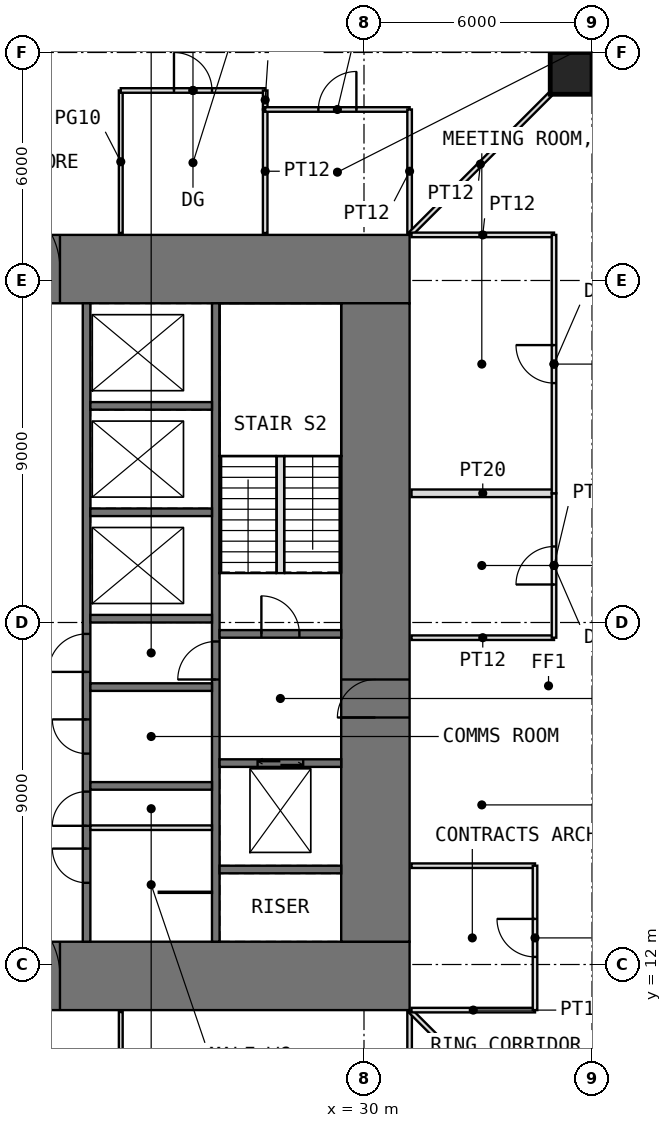
"""IFC4 building model, lengths in metres.
Left out: names, types, materials, properties, quantities, classifications, styles, units other than length and angle.
Written with IfcOpenShell. Run it as: python <this file> out.ifc"""

import sys

from ifc_helpers import new_model, si_unit, direction, frame, frame_2d, origin, origin_2d, place, context, subcontext, project, spatial, rectangle, extrude, element, fill, save


model = new_model("IFC4")
c1 = context("Model", 3, precision=1e-05, world=origin(), true_north=direction((0.0, 1.0)))
c2 = subcontext(c1, "Body", "Model", "MODEL_VIEW")
j1 = project(units=[si_unit("LENGTHUNIT", "METRE"), si_unit("PLANEANGLEUNIT", "RADIAN")], contexts=[c1])
p1 = place(None, origin())
s1 = spatial("IfcSite", under=j1, at=p1, CompositionType="ELEMENT")
p2 = place(p1, origin())
s2 = spatial("IfcBuilding", under=s1, at=p2, CompositionType="ELEMENT")
p3 = place(p2, frame((0.0, 0.0, 70.5)))
s3 = spatial("IfcBuildingStorey", under=s2, at=p3, CompositionType="ELEMENT", Elevation=70.5)
p4 = place(p3, frame((35.45, 35.45, 0.0), z_axis=(0.0, 0.0, 1.0), x_axis=(1.0, 0.0, 0.0)))
e1 = element("IfcColumn", 1, at=p4, inside=s3, PredefinedType="COLUMN", context=c2, shape_type="SweptSolid", body=[
    extrude(rectangle(XDim=1.1, YDim=1.1, at=origin_2d()), origin(), (0.0, 0.0, 1.0), 4.0),
])
p5 = place(p3, frame((10.8, 11.7, -0.05), z_axis=(0.0, 0.0, 1.0), x_axis=(1.0, 0.0, 0.0)))
e2 = element("IfcWall", 2, at=p5, inside=s3, PredefinedType="SHEAR", context=c2, shape_type="SweptSolid", body=[
    extrude(rectangle(XDim=20.4, YDim=1.8, at=frame_2d((10.2, 0.0))), origin(), (0.0, 0.0, 1.0), 4.0),
])
p6 = place(p5, frame((9.2, 0.0, 0.05)))
e3 = element("IfcOpeningElement", 3, at=p6, cuts=e2, PredefinedType="OPENING", context=c2, shape_type="SweptSolid", body=[
    extrude(rectangle(XDim=2.0, YDim=2.2, at=frame_2d((1.0, 1.1))), frame((0.0, 0.91, 0.0), z_axis=(0.0, -1.0, 0.0), x_axis=(1.0, 0.0, 0.0)), (0.0, 0.0, 1.0), 1.82),
])
p7 = place(p3, frame((10.8, 30.3, -0.05), z_axis=(0.0, 0.0, 1.0), x_axis=(1.0, 0.0, 0.0)))
e4 = element("IfcWall", 4, at=p7, inside=s3, PredefinedType="SHEAR", context=c2, shape_type="SweptSolid", body=[
    extrude(rectangle(XDim=20.4, YDim=1.8, at=frame_2d((10.2, 0.0))), origin(), (0.0, 0.0, 1.0), 4.0),
])
p8 = place(p7, frame((9.2, 0.0, 0.05)))
e5 = element("IfcOpeningElement", 5, at=p8, cuts=e4, PredefinedType="OPENING", context=c2, shape_type="SweptSolid", body=[
    extrude(rectangle(XDim=2.0, YDim=2.2, at=frame_2d((1.0, 1.1))), frame((0.0, 0.91, 0.0), z_axis=(0.0, -1.0, 0.0), x_axis=(1.0, 0.0, 0.0)), (0.0, 0.0, 1.0), 1.82),
])
p9 = place(p3, frame((30.3, 12.6, -0.05), z_axis=(0.0, 0.0, 1.0), x_axis=(0.0, 1.0, 0.0)))
e6 = element("IfcWall", 6, at=p9, inside=s3, PredefinedType="SHEAR", context=c2, shape_type="SweptSolid", body=[
    extrude(rectangle(XDim=16.8, YDim=1.8, at=frame_2d((8.4, 0.0))), origin(), (0.0, 0.0, 1.0), 4.0),
])
p10 = place(p9, frame((5.9, 0.0, 0.05)))
e7 = element("IfcOpeningElement", 7, at=p10, cuts=e6, PredefinedType="OPENING", context=c2, shape_type="SweptSolid", body=[
    extrude(rectangle(XDim=1.0, YDim=2.2, at=frame_2d((0.5, 1.1))), frame((0.0, 0.91, 0.0), z_axis=(0.0, -1.0, 0.0), x_axis=(1.0, 0.0, 0.0)), (0.0, 0.0, 1.0), 1.82),
])
p11 = place(p3, frame((22.7, 12.6, -0.05), z_axis=(0.0, 0.0, 1.0), x_axis=(0.0, 1.0, 0.0)))
e8 = element("IfcWall", 8, at=p11, inside=s3, PredefinedType="SHEAR", context=c2, shape_type="SweptSolid", body=[
    extrude(rectangle(XDim=16.8, YDim=0.2, at=frame_2d((8.4, 0.0))), origin(), (0.0, 0.0, 1.0), 4.0),
])
p12 = place(p11, frame((3.05, 0.0, 0.05)))
e9 = element("IfcOpeningElement", 9, at=p12, cuts=e8, PredefinedType="OPENING", context=c2, shape_type="SweptSolid", body=[
    extrude(rectangle(XDim=0.9, YDim=2.2, at=frame_2d((0.45, 1.1))), frame((0.0, 0.11, 0.0), z_axis=(0.0, -1.0, 0.0), x_axis=(1.0, 0.0, 0.0)), (0.0, 0.0, 1.0), 0.22),
])
p13 = place(p11, frame((7.1, 0.0, 0.05)))
e10 = element("IfcOpeningElement", 10, at=p13, cuts=e8, PredefinedType="OPENING", context=c2, shape_type="SweptSolid", body=[
    extrude(rectangle(XDim=1.0, YDim=2.2, at=frame_2d((0.5, 1.1))), frame((0.0, 0.11, 0.0), z_axis=(0.0, -1.0, 0.0), x_axis=(1.0, 0.0, 0.0)), (0.0, 0.0, 1.0), 0.22),
])
p14 = place(p11, frame((1.55, 0.0, 0.05)))
e11 = element("IfcOpeningElement", 11, at=p14, cuts=e8, PredefinedType="OPENING", context=c2, shape_type="SweptSolid", body=[
    extrude(rectangle(XDim=0.9, YDim=2.2, at=frame_2d((0.45, 1.1))), frame((0.0, 0.11, 0.0), z_axis=(0.0, -1.0, 0.0), x_axis=(1.0, 0.0, 0.0)), (0.0, 0.0, 1.0), 0.22),
])
p15 = place(p11, frame((4.95, 0.0, 0.05)))
e12 = element("IfcOpeningElement", 12, at=p15, cuts=e8, PredefinedType="OPENING", context=c2, shape_type="SweptSolid", body=[
    extrude(rectangle(XDim=0.9, YDim=2.2, at=frame_2d((0.45, 1.1))), frame((0.0, 0.11, 0.0), z_axis=(0.0, -1.0, 0.0), x_axis=(1.0, 0.0, 0.0)), (0.0, 0.0, 1.0), 0.22),
])
p16 = place(p3, frame((26.1, 12.6, -0.05), z_axis=(0.0, 0.0, 1.0), x_axis=(0.0, 1.0, 0.0)))
e13 = element("IfcWall", 13, at=p16, inside=s3, PredefinedType="SHEAR", context=c2, shape_type="SweptSolid", body=[
    extrude(rectangle(XDim=16.8, YDim=0.2, at=frame_2d((8.4, 0.0))), origin(), (0.0, 0.0, 1.0), 4.0),
])
p17 = place(p16, frame((6.9, 0.0, 0.05)))
e14 = element("IfcOpeningElement", 14, at=p17, cuts=e13, PredefinedType="OPENING", context=c2, shape_type="SweptSolid", body=[
    extrude(rectangle(XDim=1.0, YDim=2.2, at=frame_2d((0.5, 1.1))), frame((0.0, 0.11, 0.0), z_axis=(0.0, -1.0, 0.0), x_axis=(1.0, 0.0, 0.0)), (0.0, 0.0, 1.0), 0.22),
])
for number, where, z_axis, x_axis in (
    (15, (22.8, 16.7, -0.05), (0.0, 0.0, 1.0), (1.0, 0.0, 0.0)),
    (16, (22.8, 19.3, -0.05), (0.0, 0.0, 1.0), (1.0, 0.0, 0.0)),
    (17, (22.8, 21.1, -0.05), (0.0, 0.0, 1.0), (1.0, 0.0, 0.0)),
    (18, (22.8, 23.9, -0.05), (0.0, 0.0, 1.0), (1.0, 0.0, 0.0)),
    (19, (22.8, 26.7, -0.05), (0.0, 0.0, 1.0), (1.0, 0.0, 0.0)),
    (20, (26.2, 14.5, -0.05), (0.0, 0.0, 1.0), (1.0, 0.0, 0.0)),
):
    element("IfcWall", number, at=place(p3, frame(where, z_axis=z_axis, x_axis=x_axis)), inside=s3, PredefinedType="SHEAR", context=c2, shape_type="SweptSolid", body=[
        extrude(rectangle(XDim=3.2, YDim=0.2, at=frame_2d((1.6, 0.0))), origin(), (0.0, 0.0, 1.0), 4.0),
    ])
p18 = place(p3, frame((26.2, 17.3, -0.05), z_axis=(0.0, 0.0, 1.0), x_axis=(1.0, 0.0, 0.0)))
e21 = element("IfcWall", 21, at=p18, inside=s3, PredefinedType="SHEAR", context=c2, shape_type="SweptSolid", body=[
    extrude(rectangle(XDim=3.2, YDim=0.2, at=frame_2d((1.6, 0.0))), origin(), (0.0, 0.0, 1.0), 4.0),
])
p19 = place(p18, frame((1.0, 0.0, 0.05)))
e22 = element("IfcOpeningElement", 22, at=p19, cuts=e21, PredefinedType="OPENING", context=c2, shape_type="SweptSolid", body=[
    extrude(rectangle(XDim=1.2, YDim=2.2, at=frame_2d((0.6, 1.1))), frame((0.0, 0.11, 0.0), z_axis=(0.0, -1.0, 0.0), x_axis=(1.0, 0.0, 0.0)), (0.0, 0.0, 1.0), 0.22),
])
p20 = place(p3, frame((26.2, 20.7, -0.05), z_axis=(0.0, 0.0, 1.0), x_axis=(1.0, 0.0, 0.0)))
e23 = element("IfcWall", 23, at=p20, inside=s3, PredefinedType="SHEAR", context=c2, shape_type="SweptSolid", body=[
    extrude(rectangle(XDim=3.2, YDim=0.2, at=frame_2d((1.6, 0.0))), origin(), (0.0, 0.0, 1.0), 4.0),
])
p21 = place(p20, frame((1.1, 0.0, 0.05)))
e24 = element("IfcOpeningElement", 24, at=p21, cuts=e23, PredefinedType="OPENING", context=c2, shape_type="SweptSolid", body=[
    extrude(rectangle(XDim=1.0, YDim=2.2, at=frame_2d((0.5, 1.1))), frame((0.0, 0.11, 0.0), z_axis=(0.0, -1.0, 0.0), x_axis=(1.0, 0.0, 0.0)), (0.0, 0.0, 1.0), 0.22),
])
p22 = place(p3, frame((22.8, 15.6, 0.0), z_axis=(0.0, 0.0, 1.0), x_axis=(1.0, 0.0, 0.0)))
e25 = element("IfcWall", 25, at=p22, inside=s3, PredefinedType="PARTITIONING", context=c2, shape_type="SweptSolid", body=[
    extrude(rectangle(XDim=3.2, YDim=0.12, at=frame_2d((1.6, 0.0))), origin(), (0.0, 0.0, 1.0), 3.75),
])
p23 = place(p3, frame((24.6, 13.9, 0.0), z_axis=(0.0, 0.0, 1.0), x_axis=(1.0, 0.0, 0.0)))
e26 = element("IfcWall", 26, at=p23, inside=s3, PredefinedType="PARTITIONING", context=c2, shape_type="SweptSolid", body=[
    extrude(rectangle(XDim=1.4, YDim=0.03, at=frame_2d((0.7, 0.0))), origin(), (0.0, 0.0, 1.0), 3.75),
])
for number, where, z_axis, x_axis in (
    (27, (23.6, 7.0, 0.0), (0.0, 0.0, 1.0), (0.0, 1.0, 0.0)),
    (28, (23.6, 31.25, 0.0), (0.0, 0.0, 1.0), (0.0, 1.0, 0.0)),
):
    element("IfcWall", number, at=place(p3, frame(where, z_axis=z_axis, x_axis=x_axis)), inside=s3, PredefinedType="PARTITIONING", context=c2, shape_type="SweptSolid", body=[
        extrude(rectangle(XDim=3.75, YDim=0.1, at=frame_2d((1.875, 0.0))), origin(), (0.0, 0.0, 1.0), 3.75),
    ])
p24 = place(p3, frame((23.6, 35.0, 0.0), z_axis=(0.0, 0.0, 1.0), x_axis=(1.0, 0.0, 0.0)))
e29 = element("IfcWall", 29, at=p24, inside=s3, PredefinedType="PARTITIONING", context=c2, shape_type="SweptSolid", body=[
    extrude(rectangle(XDim=3.8, YDim=0.12, at=frame_2d((1.9, 0.0))), origin(), (0.0, 0.0, 1.0), 3.75),
])
p25 = place(p24, frame((1.4, 0.0, 0.0)))
e30 = element("IfcOpeningElement", 30, at=p25, cuts=e29, PredefinedType="OPENING", context=c2, shape_type="SweptSolid", body=[
    extrude(rectangle(XDim=1.0, YDim=2.4, at=frame_2d((0.5, 1.2))), frame((0.0, 0.07, 0.0), z_axis=(0.0, -1.0, 0.0), x_axis=(1.0, 0.0, 0.0)), (0.0, 0.0, 1.0), 0.14),
])
p26 = place(p3, frame((27.4, 31.25, 0.0), z_axis=(0.0, 0.0, 1.0), x_axis=(0.0, 1.0, 0.0)))
e31 = element("IfcWall", 31, at=p26, inside=s3, PredefinedType="PARTITIONING", context=c2, shape_type="SweptSolid", body=[
    extrude(rectangle(XDim=3.25, YDim=0.12, at=frame_2d((1.625, 0.0))), origin(), (0.0, 0.0, 1.0), 3.75),
])
p27 = place(p3, frame((27.4, 34.5, 0.0), z_axis=(0.0, 0.0, 1.0), x_axis=(0.0, 1.0, 0.0)))
e32 = element("IfcWall", 32, at=p27, inside=s3, PredefinedType="PARTITIONING", context=c2, shape_type="SweptSolid", body=[
    extrude(rectangle(XDim=0.5, YDim=0.12, at=frame_2d((0.25, 0.0))), origin(), (0.0, 0.0, 1.0), 3.75),
])
p28 = place(p3, frame((27.4, 34.5, 0.0), z_axis=(0.0, 0.0, 1.0), x_axis=(1.0, 0.0, 0.0)))
e33 = element("IfcWall", 33, at=p28, inside=s3, PredefinedType="PARTITIONING", context=c2, shape_type="SweptSolid", body=[
    extrude(rectangle(XDim=3.8, YDim=0.12, at=frame_2d((1.9, 0.0))), origin(), (0.0, 0.0, 1.0), 3.75),
])
p29 = place(p28, frame((1.4, 0.0, 0.0)))
e34 = element("IfcOpeningElement", 34, at=p29, cuts=e33, PredefinedType="OPENING", context=c2, shape_type="SweptSolid", body=[
    extrude(rectangle(XDim=1.0, YDim=2.2, at=frame_2d((0.5, 1.1))), frame((0.0, 0.07, 0.0), z_axis=(0.0, -1.0, 0.0), x_axis=(1.0, 0.0, 0.0)), (0.0, 0.0, 1.0), 0.14),
])
p30 = place(p3, frame((31.2, 7.0, 0.0), z_axis=(0.0, 0.0, 1.0), x_axis=(0.0, 1.0, 0.0)))
e35 = element("IfcWall", 35, at=p30, inside=s3, PredefinedType="PARTITIONING", context=c2, shape_type="SweptSolid", body=[
    extrude(rectangle(XDim=3.75, YDim=0.12, at=frame_2d((1.875, 0.0))), origin(), (0.0, 0.0, 1.0), 3.75),
])
p31 = place(p3, frame((31.2, 31.25, 0.0), z_axis=(0.0, 0.0, 1.0), x_axis=(0.0, 1.0, 0.0)))
e36 = element("IfcWall", 36, at=p31, inside=s3, PredefinedType="PARTITIONING", context=c2, shape_type="SweptSolid", body=[
    extrude(rectangle(XDim=3.25, YDim=0.12, at=frame_2d((1.625, 0.0))), origin(), (0.0, 0.0, 1.0), 3.75),
])
p32 = place(p3, frame((31.235, 10.765, 0.0), z_axis=(0.0, 0.0, 1.0), x_axis=(0.707106781187, -0.707106781187, 0.0)))
e37 = element("IfcWall", 37, at=p32, inside=s3, PredefinedType="PARTITIONING", context=c2, shape_type="SweptSolid", body=[
    extrude(rectangle(XDim=3.346, YDim=0.12, at=frame_2d((1.673, 0.0))), origin(), (0.0, 0.0, 1.0), 3.75),
])
p33 = place(p3, frame((31.235, 31.235, 0.0), z_axis=(0.0, 0.0, 1.0), x_axis=(0.707106781187, 0.707106781187, 0.0)))
e38 = element("IfcWall", 38, at=p33, inside=s3, PredefinedType="PARTITIONING", context=c2, shape_type="SweptSolid", body=[
    extrude(rectangle(XDim=5.168, YDim=0.12, at=frame_2d((2.584, 0.0))), origin(), (0.0, 0.0, 1.0), 3.75),
])
for number, where, z_axis, x_axis in (
    (39, (31.25, 10.8, 0.0), (0.0, 0.0, 1.0), (1.0, 0.0, 0.0)),
    (40, (31.25, 14.6, 0.0), (0.0, 0.0, 1.0), (1.0, 0.0, 0.0)),
):
    element("IfcWall", number, at=place(p3, frame(where, z_axis=z_axis, x_axis=x_axis)), inside=s3, PredefinedType="PARTITIONING", context=c2, shape_type="SweptSolid", body=[
        extrude(rectangle(XDim=3.25, YDim=0.12, at=frame_2d((1.625, 0.0))), origin(), (0.0, 0.0, 1.0), 3.75),
    ])
p34 = place(p3, frame((31.25, 20.6, 0.0), z_axis=(0.0, 0.0, 1.0), x_axis=(1.0, 0.0, 0.0)))
e41 = element("IfcWall", 41, at=p34, inside=s3, PredefinedType="PARTITIONING", context=c2, shape_type="SweptSolid", body=[
    extrude(rectangle(XDim=3.75, YDim=0.12, at=frame_2d((1.875, 0.0))), origin(), (0.0, 0.0, 1.0), 3.75),
])
p35 = place(p3, frame((31.25, 24.4, 0.0), z_axis=(0.0, 0.0, 1.0), x_axis=(1.0, 0.0, 0.0)))
e42 = element("IfcWall", 42, at=p35, inside=s3, PredefinedType="PARTITIONING", context=c2, shape_type="SweptSolid", body=[
    extrude(rectangle(XDim=3.75, YDim=0.2, at=frame_2d((1.875, 0.0))), origin(), (0.0, 0.0, 1.0), 3.75),
])
p36 = place(p3, frame((31.25, 31.2, 0.0), z_axis=(0.0, 0.0, 1.0), x_axis=(1.0, 0.0, 0.0)))
e43 = element("IfcWall", 43, at=p36, inside=s3, PredefinedType="PARTITIONING", context=c2, shape_type="SweptSolid", body=[
    extrude(rectangle(XDim=3.75, YDim=0.12, at=frame_2d((1.875, 0.0))), origin(), (0.0, 0.0, 1.0), 3.75),
])
p37 = place(p3, frame((34.5, 10.8, 0.0), z_axis=(0.0, 0.0, 1.0), x_axis=(0.0, 1.0, 0.0)))
e44 = element("IfcWall", 44, at=p37, inside=s3, PredefinedType="PARTITIONING", context=c2, shape_type="SweptSolid", body=[
    extrude(rectangle(XDim=3.8, YDim=0.12, at=frame_2d((1.9, 0.0))), origin(), (0.0, 0.0, 1.0), 3.75),
])
p38 = place(p37, frame((1.4, 0.0, 0.0)))
e45 = element("IfcOpeningElement", 45, at=p38, cuts=e44, PredefinedType="OPENING", context=c2, shape_type="SweptSolid", body=[
    extrude(rectangle(XDim=1.0, YDim=2.2, at=frame_2d((0.5, 1.1))), frame((0.0, 0.07, 0.0), z_axis=(0.0, -1.0, 0.0), x_axis=(1.0, 0.0, 0.0)), (0.0, 0.0, 1.0), 0.14),
])
p39 = place(p3, frame((35.0, 20.6, 0.0), z_axis=(0.0, 0.0, 1.0), x_axis=(0.0, 1.0, 0.0)))
e46 = element("IfcWall", 46, at=p39, inside=s3, PredefinedType="PARTITIONING", context=c2, shape_type="SweptSolid", body=[
    extrude(rectangle(XDim=3.8, YDim=0.12, at=frame_2d((1.9, 0.0))), origin(), (0.0, 0.0, 1.0), 3.75),
])
p40 = place(p39, frame((1.4, 0.0, 0.0)))
e47 = element("IfcOpeningElement", 47, at=p40, cuts=e46, PredefinedType="OPENING", context=c2, shape_type="SweptSolid", body=[
    extrude(rectangle(XDim=1.0, YDim=2.4, at=frame_2d((0.5, 1.2))), frame((0.0, 0.07, 0.0), z_axis=(0.0, -1.0, 0.0), x_axis=(1.0, 0.0, 0.0)), (0.0, 0.0, 1.0), 0.14),
])
p41 = place(p3, frame((35.0, 24.4, 0.0), z_axis=(0.0, 0.0, 1.0), x_axis=(0.0, 1.0, 0.0)))
e48 = element("IfcWall", 48, at=p41, inside=s3, PredefinedType="PARTITIONING", context=c2, shape_type="SweptSolid", body=[
    extrude(rectangle(XDim=6.8, YDim=0.12, at=frame_2d((3.4, 0.0))), origin(), (0.0, 0.0, 1.0), 3.75),
])
p42 = place(p41, frame((2.9, 0.0, 0.0)))
e49 = element("IfcOpeningElement", 49, at=p42, cuts=e48, PredefinedType="OPENING", context=c2, shape_type="SweptSolid", body=[
    extrude(rectangle(XDim=1.0, YDim=2.4, at=frame_2d((0.5, 1.2))), frame((0.0, 0.07, 0.0), z_axis=(0.0, -1.0, 0.0), x_axis=(1.0, 0.0, 0.0)), (0.0, 0.0, 1.0), 0.14),
])
p43 = place(p3, frame((27.8, 22.3, 0.0), z_axis=(0.0, 0.0, 1.0), x_axis=(0.0, 1.0, 0.0)))
e50 = element("IfcWall", 50, at=p43, inside=s3, PredefinedType="PARTITIONING", context=c2, shape_type="SweptSolid", body=[
    extrude(rectangle(XDim=3.08, YDim=0.2, at=frame_2d((1.54, 0.0))), origin(), (0.0, 0.0, 1.0), 4.0),
])
p44 = place(p6, origin())
e51 = element("IfcDoor", 51, at=p44, inside=s3, OperationType="DOUBLE_DOOR_SINGLE_SWING", PredefinedType="DOOR", context=c2, shape_type="SweptSolid", body=[
    extrude(rectangle(XDim=2.0, YDim=2.2, at=frame_2d((1.0, 1.1))), frame((0.0, 0.025, 0.0), z_axis=(0.0, -1.0, 0.0), x_axis=(1.0, 0.0, 0.0)), (0.0, 0.0, 1.0), 0.05),
])
fill(e3, e51)
p45 = place(p8, origin())
e52 = element("IfcDoor", 52, at=p45, inside=s3, OperationType="DOUBLE_DOOR_SINGLE_SWING", PredefinedType="DOOR", context=c2, shape_type="SweptSolid", body=[
    extrude(rectangle(XDim=2.0, YDim=2.2, at=frame_2d((1.0, 1.1))), frame((0.0, 0.025, 0.0), z_axis=(0.0, -1.0, 0.0), x_axis=(1.0, 0.0, 0.0)), (0.0, 0.0, 1.0), 0.05),
])
fill(e5, e52)
p46 = place(p12, origin())
e53 = element("IfcDoor", 53, at=p46, inside=s3, OperationType="SINGLE_SWING_LEFT", PredefinedType="DOOR", context=c2, shape_type="SweptSolid", body=[
    extrude(rectangle(XDim=0.9, YDim=2.2, at=frame_2d((0.45, 1.1))), frame((0.0, 0.025, 0.0), z_axis=(0.0, -1.0, 0.0), x_axis=(1.0, 0.0, 0.0)), (0.0, 0.0, 1.0), 0.05),
])
fill(e9, e53)
p47 = place(p10, origin())
e54 = element("IfcDoor", 54, at=p47, inside=s3, OperationType="SINGLE_SWING_LEFT", PredefinedType="DOOR", context=c2, shape_type="SweptSolid", body=[
    extrude(rectangle(XDim=1.0, YDim=2.2, at=frame_2d((0.5, 1.1))), frame((0.0, 0.025, 0.0), z_axis=(0.0, -1.0, 0.0), x_axis=(1.0, 0.0, 0.0)), (0.0, 0.0, 1.0), 0.05),
])
fill(e7, e54)
p48 = place(p21, origin())
e55 = element("IfcDoor", 55, at=p48, inside=s3, OperationType="SINGLE_SWING_LEFT", PredefinedType="DOOR", context=c2, shape_type="SweptSolid", body=[
    extrude(rectangle(XDim=1.0, YDim=2.2, at=frame_2d((0.5, 1.1))), frame((0.0, 0.025, 0.0), z_axis=(0.0, -1.0, 0.0), x_axis=(1.0, 0.0, 0.0)), (0.0, 0.0, 1.0), 0.05),
])
fill(e24, e55)
p49 = place(p17, origin())
e56 = element("IfcDoor", 56, at=p49, inside=s3, OperationType="SINGLE_SWING_LEFT", PredefinedType="DOOR", context=c2, shape_type="SweptSolid", body=[
    extrude(rectangle(XDim=1.0, YDim=2.2, at=frame_2d((0.5, 1.1))), frame((0.0, 0.025, 0.0), z_axis=(0.0, -1.0, 0.0), x_axis=(1.0, 0.0, 0.0)), (0.0, 0.0, 1.0), 0.05),
])
fill(e14, e56)
p50 = place(p13, origin())
e57 = element("IfcDoor", 57, at=p50, inside=s3, OperationType="SINGLE_SWING_LEFT", PredefinedType="DOOR", context=c2, shape_type="SweptSolid", body=[
    extrude(rectangle(XDim=1.0, YDim=2.2, at=frame_2d((0.5, 1.1))), frame((0.0, 0.025, 0.0), z_axis=(0.0, -1.0, 0.0), x_axis=(1.0, 0.0, 0.0)), (0.0, 0.0, 1.0), 0.05),
])
fill(e10, e57)
p51 = place(p14, origin())
e58 = element("IfcDoor", 58, at=p51, inside=s3, OperationType="SINGLE_SWING_RIGHT", PredefinedType="DOOR", context=c2, shape_type="SweptSolid", body=[
    extrude(rectangle(XDim=0.9, YDim=2.2, at=frame_2d((0.45, 1.1))), frame((0.0, 0.025, 0.0), z_axis=(0.0, -1.0, 0.0), x_axis=(1.0, 0.0, 0.0)), (0.0, 0.0, 1.0), 0.05),
])
fill(e11, e58)
p52 = place(p15, origin())
e59 = element("IfcDoor", 59, at=p52, inside=s3, OperationType="SINGLE_SWING_RIGHT", PredefinedType="DOOR", context=c2, shape_type="SweptSolid", body=[
    extrude(rectangle(XDim=0.9, YDim=2.2, at=frame_2d((0.45, 1.1))), frame((0.0, 0.025, 0.0), z_axis=(0.0, -1.0, 0.0), x_axis=(1.0, 0.0, 0.0)), (0.0, 0.0, 1.0), 0.05),
])
fill(e12, e59)
p53 = place(p38, origin())
e60 = element("IfcDoor", 60, at=p53, inside=s3, OperationType="SINGLE_SWING_RIGHT", PredefinedType="DOOR", context=c2, shape_type="SweptSolid", body=[
    extrude(rectangle(XDim=1.0, YDim=2.2, at=frame_2d((0.5, 1.1))), frame((0.0, 0.025, 0.0), z_axis=(0.0, -1.0, 0.0), x_axis=(1.0, 0.0, 0.0)), (0.0, 0.0, 1.0), 0.05),
])
fill(e45, e60)
p54 = place(p40, origin())
e61 = element("IfcDoor", 61, at=p54, inside=s3, OperationType="SINGLE_SWING_LEFT", PredefinedType="DOOR", context=c2, shape_type="SweptSolid", body=[
    extrude(rectangle(XDim=1.0, YDim=2.4, at=frame_2d((0.5, 1.2))), frame((0.0, 0.025, 0.0), z_axis=(0.0, -1.0, 0.0), x_axis=(1.0, 0.0, 0.0)), (0.0, 0.0, 1.0), 0.05),
])
fill(e47, e61)
p55 = place(p42, origin())
e62 = element("IfcDoor", 62, at=p55, inside=s3, OperationType="SINGLE_SWING_RIGHT", PredefinedType="DOOR", context=c2, shape_type="SweptSolid", body=[
    extrude(rectangle(XDim=1.0, YDim=2.4, at=frame_2d((0.5, 1.2))), frame((0.0, 0.025, 0.0), z_axis=(0.0, -1.0, 0.0), x_axis=(1.0, 0.0, 0.0)), (0.0, 0.0, 1.0), 0.05),
])
fill(e49, e62)
p56 = place(p25, origin())
e63 = element("IfcDoor", 63, at=p56, inside=s3, OperationType="SINGLE_SWING_LEFT", PredefinedType="DOOR", context=c2, shape_type="SweptSolid", body=[
    extrude(rectangle(XDim=1.0, YDim=2.4, at=frame_2d((0.5, 1.2))), frame((0.0, 0.025, 0.0), z_axis=(0.0, -1.0, 0.0), x_axis=(1.0, 0.0, 0.0)), (0.0, 0.0, 1.0), 0.05),
])
fill(e30, e63)
p57 = place(p29, origin())
e64 = element("IfcDoor", 64, at=p57, inside=s3, OperationType="SINGLE_SWING_RIGHT", PredefinedType="DOOR", context=c2, shape_type="SweptSolid", body=[
    extrude(rectangle(XDim=1.0, YDim=2.2, at=frame_2d((0.5, 1.1))), frame((0.0, 0.025, 0.0), z_axis=(0.0, -1.0, 0.0), x_axis=(1.0, 0.0, 0.0)), (0.0, 0.0, 1.0), 0.05),
])
fill(e34, e64)
p58 = place(p19, origin())
e65 = element("IfcDoor", 65, at=p58, inside=s3, OperationType="DOUBLE_DOOR_SLIDING", PredefinedType="DOOR", context=c2, shape_type="SweptSolid", body=[
    extrude(rectangle(XDim=1.2, YDim=2.2, at=frame_2d((0.6, 1.1))), frame((0.0, 0.025, 0.0), z_axis=(0.0, -1.0, 0.0), x_axis=(1.0, 0.0, 0.0)), (0.0, 0.0, 1.0), 0.05),
])
fill(e22, e65)
save(model, sys.argv[1])
